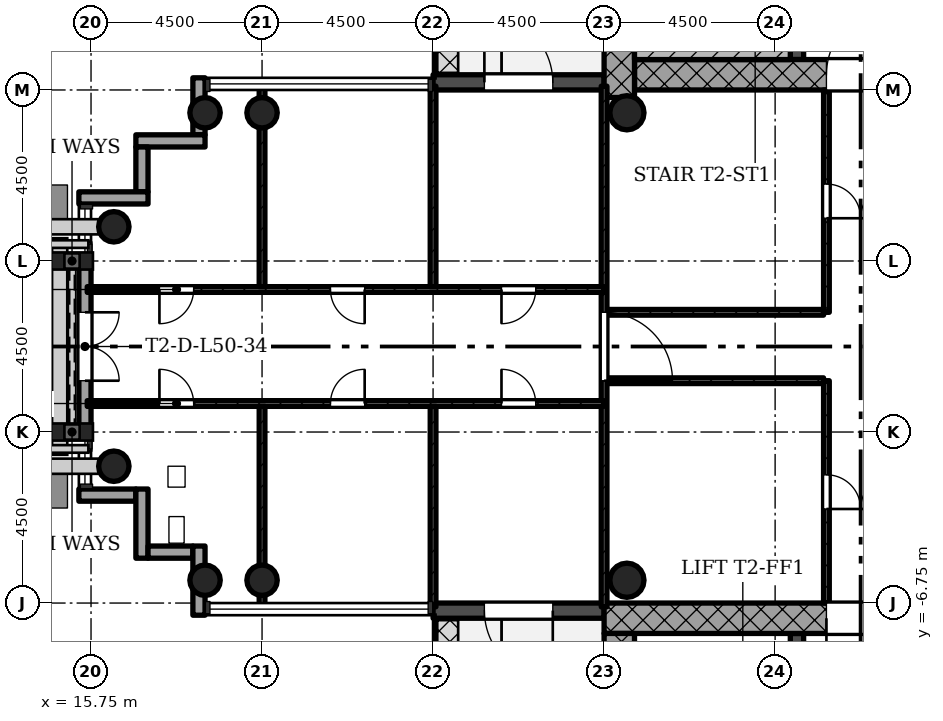
"""IFC4 building model, lengths in metres.
Left out: names, types, materials, properties, quantities, classifications, styles, units other than length and angle.
Written with IfcOpenShell. Run it as: python <this file> out.ifc"""

import sys

from ifc_helpers import new_model, si_unit, direction, frame, frame_2d, origin, origin_2d, place, context, subcontext, project, spatial, rectangle, hollow_circle, extrude, element, fill, save


model = new_model("IFC4")
c1 = context("Model", 3, precision=1e-05, world=origin(), true_north=direction((0.0, 1.0)))
c2 = subcontext(c1, "Body", "Model", "MODEL_VIEW")
j1 = project(units=[si_unit("LENGTHUNIT", "METRE"), si_unit("PLANEANGLEUNIT", "RADIAN")], contexts=[c1])
p1 = place(None, origin())
s1 = spatial("IfcSite", under=j1, at=p1, CompositionType="ELEMENT")
p2 = place(p1, origin())
s2 = spatial("IfcBuilding", under=s1, at=p2, CompositionType="ELEMENT")
p3 = place(p2, frame((0.0, 0.0, 181.3)))
s3 = spatial("IfcBuildingStorey", under=s2, at=p3, CompositionType="ELEMENT", Elevation=181.3)
p4 = place(p3, frame((30.05, 7.15, 0.0), z_axis=(0.0, 0.0, 1.0), x_axis=(1.0, 0.0, 0.0)))
e1 = element("IfcWall", 1, at=p4, inside=s3, PredefinedType="SHEAR", context=c2, shape_type="SweptSolid", body=[
    extrude(rectangle(XDim=12.7, YDim=0.8, at=frame_2d((6.35, 0.0))), origin(), (0.0, 0.0, 1.0), 4.5),
])
p5 = place(p4, frame((5.05, 0.0, 0.0)))
e2 = element("IfcOpeningElement", 2, at=p5, cuts=e1, PredefinedType="OPENING", context=c2, shape_type="SweptSolid", body=[
    extrude(rectangle(XDim=1.8, YDim=2.1, at=frame_2d((0.9, 1.05))), frame((0.0, 0.41, 0.0), z_axis=(0.0, -1.0, 0.0), x_axis=(1.0, 0.0, 0.0)), (0.0, 0.0, 1.0), 0.82),
])
p6 = place(p3, frame((29.65, 15.348, 0.0), z_axis=(0.0, 0.0, 1.0), x_axis=(0.0, -1.0, 0.0)))
e3 = element("IfcWall", 3, at=p6, inside=s3, PredefinedType="SHEAR", context=c2, shape_type="SweptSolid", body=[
    extrude(rectangle(XDim=8.796, YDim=0.8, at=frame_2d((4.398, 0.0))), origin(), (0.0, 0.0, 1.0), 4.5),
])
p7 = place(p3, frame((34.325, 7.55, 0.0), z_axis=(0.0, 0.0, 1.0), x_axis=(0.0, 1.0, 0.0)))
e4 = element("IfcWall", 4, at=p7, inside=s3, PredefinedType="SHEAR", context=c2, shape_type="SweptSolid", body=[
    extrude(rectangle(XDim=7.4, YDim=0.35, at=frame_2d((3.7, 0.0))), origin(), (0.0, 0.0, 1.0), 4.5),
])
p8 = place(p7, frame((0.85, 0.0, 0.0)))
e5 = element("IfcOpeningElement", 5, at=p8, cuts=e4, PredefinedType="OPENING", context=c2, shape_type="SweptSolid", body=[
    extrude(rectangle(XDim=0.9, YDim=2.1, at=frame_2d((0.45, 1.05))), frame((0.0, 0.185, 0.0), z_axis=(0.0, -1.0, 0.0), x_axis=(1.0, 0.0, 0.0)), (0.0, 0.0, 1.0), 0.37),
])
p9 = place(p3, frame((41.95, -7.15, 0.0), z_axis=(0.0, 0.0, 1.0), x_axis=(-1.0, 0.0, 0.0)))
e6 = element("IfcWall", 6, at=p9, inside=s3, PredefinedType="SHEAR", context=c2, shape_type="SweptSolid", body=[
    extrude(rectangle(XDim=12.7, YDim=0.8, at=frame_2d((6.35, 0.0))), origin(), (0.0, 0.0, 1.0), 4.5),
])
p10 = place(p9, frame((5.05, 0.0, 0.0)))
e7 = element("IfcOpeningElement", 7, at=p10, cuts=e6, PredefinedType="OPENING", context=c2, shape_type="SweptSolid", body=[
    extrude(rectangle(XDim=1.8, YDim=2.1, at=frame_2d((0.9, 1.05))), frame((0.0, 0.41, 0.0), z_axis=(0.0, -1.0, 0.0), x_axis=(1.0, 0.0, 0.0)), (0.0, 0.0, 1.0), 0.82),
])
p11 = place(p3, frame((29.65, -7.55, 0.0), z_axis=(0.0, 0.0, 1.0), x_axis=(0.0, -1.0, 0.0)))
e8 = element("IfcWall", 8, at=p11, inside=s3, PredefinedType="SHEAR", context=c2, shape_type="SweptSolid", body=[
    extrude(rectangle(XDim=8.2, YDim=0.8, at=frame_2d((4.1, 0.0))), origin(), (0.0, 0.0, 1.0), 4.5),
])
p12 = place(p3, frame((34.325, -14.95, 0.0), z_axis=(0.0, 0.0, 1.0), x_axis=(0.0, 1.0, 0.0)))
e9 = element("IfcWall", 9, at=p12, inside=s3, PredefinedType="SHEAR", context=c2, shape_type="SweptSolid", body=[
    extrude(rectangle(XDim=7.4, YDim=0.35, at=frame_2d((3.7, 0.0))), origin(), (0.0, 0.0, 1.0), 4.5),
])
p13 = place(p12, frame((5.35, 0.0, 0.0)))
e10 = element("IfcOpeningElement", 10, at=p13, cuts=e9, PredefinedType="OPENING", context=c2, shape_type="SweptSolid", body=[
    extrude(rectangle(XDim=1.1, YDim=2.1, at=frame_2d((0.55, 1.05))), frame((0.0, 0.185, 0.0), z_axis=(0.0, -1.0, 0.0), x_axis=(1.0, 0.0, 0.0)), (0.0, 0.0, 1.0), 0.37),
])
p14 = place(p12, frame((1.0, 0.0, 0.0)))
e11 = element("IfcOpeningElement", 11, at=p14, cuts=e9, PredefinedType="OPENING", context=c2, shape_type="SweptSolid", body=[
    extrude(rectangle(XDim=1.1, YDim=2.1, at=frame_2d((0.55, 1.05))), frame((0.0, 0.185, 0.0), z_axis=(0.0, -1.0, 0.0), x_axis=(1.0, 0.0, 0.0)), (0.0, 0.0, 1.0), 0.37),
])
p15 = place(p12, frame((3.3, 0.0, 0.0)))
e12 = element("IfcOpeningElement", 12, at=p15, cuts=e9, PredefinedType="OPENING", context=c2, shape_type="SweptSolid", body=[
    extrude(rectangle(XDim=0.9, YDim=2.1, at=frame_2d((0.45, 1.05))), frame((0.0, 0.185, 0.0), z_axis=(0.0, -1.0, 0.0), x_axis=(1.0, 0.0, 0.0)), (0.0, 0.0, 1.0), 0.37),
])
for number, where, z_axis, x_axis in (
    (13, (20.25, 6.15, 0.0), (0.0, 0.0, 1.0), (1.0, 0.0, 0.0)),
    (14, (20.25, -6.15, 0.0), (0.0, 0.0, 1.0), (1.0, 0.0, 0.0)),
    (15, (18.75, 6.15, 0.0), (0.0, 0.0, 1.0), (1.0, 0.0, 0.0)),
    (16, (18.75, -6.15, 0.0), (0.0, 0.0, 1.0), (1.0, 0.0, 0.0)),
    (17, (16.35, 3.15, 0.0), (0.0, 0.0, 1.0), (1.0, 0.0, 0.0)),
    (18, (16.35, -3.15, 0.0), (0.0, 0.0, 1.0), (1.0, 0.0, 0.0)),
):
    element("IfcColumn", number, at=place(p3, frame(where, z_axis=z_axis, x_axis=x_axis)), inside=s3, PredefinedType="COLUMN", context=c2, shape_type="SweptSolid", body=[
        extrude(hollow_circle(Radius=0.4, WallThickness=0.028, at=origin_2d()), origin(), (0.0, 0.0, 1.0), 4.5),
    ])
for number, where, z_axis, x_axis in (
    (19, (29.85, 6.15, 0.0), (0.0, 0.0, 1.0), (1.0, 0.0, 0.0)),
    (20, (29.85, -6.15, 0.0), (0.0, 0.0, 1.0), (1.0, 0.0, 0.0)),
):
    element("IfcColumn", number, at=place(p3, frame(where, z_axis=z_axis, x_axis=x_axis)), inside=s3, PredefinedType="COLUMN", context=c2, shape_type="SweptSolid", body=[
        extrude(hollow_circle(Radius=0.45, WallThickness=0.032, at=origin_2d()), origin(), (0.0, 0.0, 1.0), 4.5),
    ])
p16 = place(p3, frame((29.25, 6.95, -0.02), z_axis=(0.0, 0.0, 1.0), x_axis=(-1.0, 0.0, 0.0)))
e21 = element("IfcWall", 21, at=p16, inside=s3, PredefinedType="STANDARD", context=c2, shape_type="SweptSolid", body=[
    extrude(rectangle(XDim=4.5, YDim=0.4, at=frame_2d((2.25, 0.0))), origin(), (0.0, 0.0, 1.0), 4.22),
])
p17 = place(p16, frame((1.35, 0.0, 0.02)))
e22 = element("IfcOpeningElement", 22, at=p17, cuts=e21, PredefinedType="OPENING", context=c2, shape_type="SweptSolid", body=[
    extrude(rectangle(XDim=1.8, YDim=2.1, at=frame_2d((0.9, 1.05))), frame((0.0, 0.21, 0.0), z_axis=(0.0, -1.0, 0.0), x_axis=(1.0, 0.0, 0.0)), (0.0, 0.0, 1.0), 0.42),
])
p18 = place(p3, frame((18.59, 7.07, -0.3), z_axis=(0.0, 0.0, 1.0), x_axis=(0.0, -1.0, 0.0)))
e23 = element("IfcWall", 23, at=p18, inside=s3, PredefinedType="STANDARD", context=c2, shape_type="SweptSolid", body=[
    extrude(rectangle(XDim=1.5, YDim=0.32, at=frame_2d((0.75, 0.0))), origin(), (0.0, 0.0, 1.0), 4.5),
])
p19 = place(p3, frame((18.75, 5.41, -0.3), z_axis=(0.0, 0.0, 1.0), x_axis=(-1.0, 0.0, 0.0)))
e24 = element("IfcWall", 24, at=p19, inside=s3, PredefinedType="STANDARD", context=c2, shape_type="SweptSolid", body=[
    extrude(rectangle(XDim=1.82, YDim=0.32, at=frame_2d((0.91, 0.0))), origin(), (0.0, 0.0, 1.0), 4.5),
])
p20 = place(p3, frame((17.09, 5.25, -0.3), z_axis=(0.0, 0.0, 1.0), x_axis=(0.0, -1.0, 0.0)))
e25 = element("IfcWall", 25, at=p20, inside=s3, PredefinedType="STANDARD", context=c2, shape_type="SweptSolid", body=[
    extrude(rectangle(XDim=1.18, YDim=0.32, at=frame_2d((0.59, 0.0))), origin(), (0.0, 0.0, 1.0), 4.5),
])
p21 = place(p3, frame((17.25, 3.91, -0.3), z_axis=(0.0, 0.0, 1.0), x_axis=(-1.0, 0.0, 0.0)))
e26 = element("IfcWall", 26, at=p21, inside=s3, PredefinedType="STANDARD", context=c2, shape_type="SweptSolid", body=[
    extrude(rectangle(XDim=1.82, YDim=0.32, at=frame_2d((0.91, 0.0))), origin(), (0.0, 0.0, 1.0), 4.5),
])
p22 = place(p3, frame((15.59, 2.25, 0.0), z_axis=(0.0, 0.0, 1.0), x_axis=(0.0, -1.0, 0.0)))
e27 = element("IfcWall", 27, at=p22, inside=s3, PredefinedType="STANDARD", context=c2, shape_type="SweptSolid", body=[
    extrude(rectangle(XDim=4.5, YDim=0.32, at=frame_2d((2.25, 0.0))), origin(), (0.0, 0.0, 1.0), 4.2),
])
p23 = place(p22, frame((1.35, 0.0, 0.0)))
e28 = element("IfcOpeningElement", 28, at=p23, cuts=e27, PredefinedType="OPENING", context=c2, shape_type="SweptSolid", body=[
    extrude(rectangle(XDim=1.8, YDim=2.1, at=frame_2d((0.9, 1.05))), frame((0.0, 0.17, 0.0), z_axis=(0.0, -1.0, 0.0), x_axis=(1.0, 0.0, 0.0)), (0.0, 0.0, 1.0), 0.34),
])
p24 = place(p3, frame((15.43, -3.91, -0.3), z_axis=(0.0, 0.0, 1.0), x_axis=(1.0, 0.0, 0.0)))
e29 = element("IfcWall", 29, at=p24, inside=s3, PredefinedType="STANDARD", context=c2, shape_type="SweptSolid", body=[
    extrude(rectangle(XDim=1.5, YDim=0.32, at=frame_2d((0.75, 0.0))), origin(), (0.0, 0.0, 1.0), 4.5),
])
p25 = place(p3, frame((17.09, -3.75, -0.3), z_axis=(0.0, 0.0, 1.0), x_axis=(0.0, -1.0, 0.0)))
e30 = element("IfcWall", 30, at=p25, inside=s3, PredefinedType="STANDARD", context=c2, shape_type="SweptSolid", body=[
    extrude(rectangle(XDim=1.82, YDim=0.32, at=frame_2d((0.91, 0.0))), origin(), (0.0, 0.0, 1.0), 4.5),
])
p26 = place(p3, frame((17.25, -5.41, -0.3), z_axis=(0.0, 0.0, 1.0), x_axis=(1.0, 0.0, 0.0)))
e31 = element("IfcWall", 31, at=p26, inside=s3, PredefinedType="STANDARD", context=c2, shape_type="SweptSolid", body=[
    extrude(rectangle(XDim=1.18, YDim=0.32, at=frame_2d((0.59, 0.0))), origin(), (0.0, 0.0, 1.0), 4.5),
])
p27 = place(p3, frame((18.59, -5.25, -0.3), z_axis=(0.0, 0.0, 1.0), x_axis=(0.0, -1.0, 0.0)))
e32 = element("IfcWall", 32, at=p27, inside=s3, PredefinedType="STANDARD", context=c2, shape_type="SweptSolid", body=[
    extrude(rectangle(XDim=1.82, YDim=0.32, at=frame_2d((0.91, 0.0))), origin(), (0.0, 0.0, 1.0), 4.5),
])
p28 = place(p3, frame((24.75, -6.95, -0.02), z_axis=(0.0, 0.0, 1.0), x_axis=(1.0, 0.0, 0.0)))
e33 = element("IfcWall", 33, at=p28, inside=s3, PredefinedType="STANDARD", context=c2, shape_type="SweptSolid", body=[
    extrude(rectangle(XDim=4.5, YDim=0.4, at=frame_2d((2.25, 0.0))), origin(), (0.0, 0.0, 1.0), 4.22),
])
p29 = place(p28, frame((1.35, 0.0, 0.02)))
e34 = element("IfcOpeningElement", 34, at=p29, cuts=e33, PredefinedType="OPENING", context=c2, shape_type="SweptSolid", body=[
    extrude(rectangle(XDim=1.8, YDim=2.1, at=frame_2d((0.9, 1.05))), frame((0.0, 0.21, 0.0), z_axis=(0.0, -1.0, 0.0), x_axis=(1.0, 0.0, 0.0)), (0.0, 0.0, 1.0), 0.42),
])
p30 = place(p3, frame((35.1, 0.9, 0.0), z_axis=(0.0, 0.0, 1.0), x_axis=(0.0, 1.0, 0.0)))
e35 = element("IfcWall", 35, at=p30, inside=s3, PredefinedType="PARTITIONING", context=c2, shape_type="SweptSolid", body=[
    extrude(rectangle(XDim=5.85, YDim=0.15, at=frame_2d((2.925, 0.0))), origin(), (0.0, 0.0, 1.0), 4.08),
])
p31 = place(p30, frame((2.475, 0.0, 0.0)))
e36 = element("IfcOpeningElement", 36, at=p31, cuts=e35, PredefinedType="OPENING", context=c2, shape_type="SweptSolid", body=[
    extrude(rectangle(XDim=0.9, YDim=2.1, at=frame_2d((0.45, 1.05))), frame((0.0, 0.085, 0.0), z_axis=(0.0, -1.0, 0.0), x_axis=(1.0, 0.0, 0.0)), (0.0, 0.0, 1.0), 0.17),
])
p32 = place(p3, frame((35.025, 0.9, 0.0), z_axis=(0.0, 0.0, 1.0), x_axis=(-1.0, 0.0, 0.0)))
e37 = element("IfcWall", 37, at=p32, inside=s3, PredefinedType="PARTITIONING", context=c2, shape_type="SweptSolid", body=[
    extrude(rectangle(XDim=5.7, YDim=0.15, at=frame_2d((2.85, 0.0))), origin(), (0.0, 0.0, 1.0), 4.08),
])
p33 = place(p3, frame((35.1, -6.75, 0.0), z_axis=(0.0, 0.0, 1.0), x_axis=(0.0, 1.0, 0.0)))
e38 = element("IfcWall", 38, at=p33, inside=s3, PredefinedType="PARTITIONING", context=c2, shape_type="SweptSolid", body=[
    extrude(rectangle(XDim=5.85, YDim=0.15, at=frame_2d((2.925, 0.0))), origin(), (0.0, 0.0, 1.0), 4.08),
])
p34 = place(p33, frame((2.475, 0.0, 0.0)))
e39 = element("IfcOpeningElement", 39, at=p34, cuts=e38, PredefinedType="OPENING", context=c2, shape_type="SweptSolid", body=[
    extrude(rectangle(XDim=0.9, YDim=2.1, at=frame_2d((0.45, 1.05))), frame((0.0, 0.085, 0.0), z_axis=(0.0, -1.0, 0.0), x_axis=(1.0, 0.0, 0.0)), (0.0, 0.0, 1.0), 0.17),
])
p35 = place(p3, frame((35.025, -0.9, 0.0), z_axis=(0.0, 0.0, 1.0), x_axis=(-1.0, 0.0, 0.0)))
e40 = element("IfcWall", 40, at=p35, inside=s3, PredefinedType="PARTITIONING", context=c2, shape_type="SweptSolid", body=[
    extrude(rectangle(XDim=5.7, YDim=0.15, at=frame_2d((2.85, 0.0))), origin(), (0.0, 0.0, 1.0), 4.08),
])
p36 = place(p3, frame((29.25, -6.85, 0.0), z_axis=(0.0, 0.0, 1.0), x_axis=(0.0, 1.0, 0.0)))
e41 = element("IfcWall", 41, at=p36, inside=s3, PredefinedType="PARTITIONING", context=c2, shape_type="SweptSolid", body=[
    extrude(rectangle(XDim=13.7, YDim=0.15, at=frame_2d((6.85, 0.0))), origin(), (0.0, 0.0, 1.0), 4.08),
])
p37 = place(p36, frame((5.95, 0.0, 0.0)))
e42 = element("IfcOpeningElement", 42, at=p37, cuts=e41, PredefinedType="OPENING", context=c2, shape_type="SweptSolid", body=[
    extrude(rectangle(XDim=1.8, YDim=2.1, at=frame_2d((0.9, 1.05))), frame((0.0, 0.085, 0.0), z_axis=(0.0, -1.0, 0.0), x_axis=(1.0, 0.0, 0.0)), (0.0, 0.0, 1.0), 0.17),
])
p38 = place(p3, frame((29.25, 1.5, 0.0), z_axis=(0.0, 0.0, 1.0), x_axis=(-1.0, 0.0, 0.0)))
e43 = element("IfcWall", 43, at=p38, inside=s3, PredefinedType="PARTITIONING", context=c2, shape_type="SweptSolid", body=[
    extrude(rectangle(XDim=13.6, YDim=0.15, at=frame_2d((6.8, 0.0))), origin(), (0.0, 0.0, 1.0), 4.08),
])
p39 = place(p38, frame((1.8, 0.0, 0.0)))
e44 = element("IfcOpeningElement", 44, at=p39, cuts=e43, PredefinedType="OPENING", context=c2, shape_type="SweptSolid", body=[
    extrude(rectangle(XDim=0.9, YDim=2.1, at=frame_2d((0.45, 1.05))), frame((0.0, 0.085, 0.0), z_axis=(0.0, -1.0, 0.0), x_axis=(1.0, 0.0, 0.0)), (0.0, 0.0, 1.0), 0.17),
])
p40 = place(p38, frame((6.3, 0.0, 0.0)))
e45 = element("IfcOpeningElement", 45, at=p40, cuts=e43, PredefinedType="OPENING", context=c2, shape_type="SweptSolid", body=[
    extrude(rectangle(XDim=0.9, YDim=2.1, at=frame_2d((0.45, 1.05))), frame((0.0, 0.085, 0.0), z_axis=(0.0, -1.0, 0.0), x_axis=(1.0, 0.0, 0.0)), (0.0, 0.0, 1.0), 0.17),
])
p41 = place(p38, frame((10.8, 0.0, 0.0)))
e46 = element("IfcOpeningElement", 46, at=p41, cuts=e43, PredefinedType="OPENING", context=c2, shape_type="SweptSolid", body=[
    extrude(rectangle(XDim=0.9, YDim=2.1, at=frame_2d((0.45, 1.05))), frame((0.0, 0.085, 0.0), z_axis=(0.0, -1.0, 0.0), x_axis=(1.0, 0.0, 0.0)), (0.0, 0.0, 1.0), 0.17),
])
for number, where, z_axis, x_axis in (
    (47, (24.75, 1.575, 0.0), (0.0, 0.0, 1.0), (0.0, 1.0, 0.0)),
    (48, (20.25, 1.575, 0.0), (0.0, 0.0, 1.0), (0.0, 1.0, 0.0)),
):
    element("IfcWall", number, at=place(p3, frame(where, z_axis=z_axis, x_axis=x_axis)), inside=s3, PredefinedType="PARTITIONING", context=c2, shape_type="SweptSolid", body=[
        extrude(rectangle(XDim=5.275, YDim=0.15, at=frame_2d((2.638, 0.0))), origin(), (0.0, 0.0, 1.0), 4.08),
    ])
p42 = place(p3, frame((29.25, -1.5, 0.0), z_axis=(0.0, 0.0, 1.0), x_axis=(-1.0, 0.0, 0.0)))
e49 = element("IfcWall", 49, at=p42, inside=s3, PredefinedType="PARTITIONING", context=c2, shape_type="SweptSolid", body=[
    extrude(rectangle(XDim=13.6, YDim=0.15, at=frame_2d((6.8, 0.0))), origin(), (0.0, 0.0, 1.0), 4.08),
])
p43 = place(p42, frame((1.8, 0.0, 0.0)))
e50 = element("IfcOpeningElement", 50, at=p43, cuts=e49, PredefinedType="OPENING", context=c2, shape_type="SweptSolid", body=[
    extrude(rectangle(XDim=0.9, YDim=2.1, at=frame_2d((0.45, 1.05))), frame((0.0, 0.085, 0.0), z_axis=(0.0, -1.0, 0.0), x_axis=(1.0, 0.0, 0.0)), (0.0, 0.0, 1.0), 0.17),
])
p44 = place(p42, frame((6.3, 0.0, 0.0)))
e51 = element("IfcOpeningElement", 51, at=p44, cuts=e49, PredefinedType="OPENING", context=c2, shape_type="SweptSolid", body=[
    extrude(rectangle(XDim=0.9, YDim=2.1, at=frame_2d((0.45, 1.05))), frame((0.0, 0.085, 0.0), z_axis=(0.0, -1.0, 0.0), x_axis=(1.0, 0.0, 0.0)), (0.0, 0.0, 1.0), 0.17),
])
p45 = place(p42, frame((10.8, 0.0, 0.0)))
e52 = element("IfcOpeningElement", 52, at=p45, cuts=e49, PredefinedType="OPENING", context=c2, shape_type="SweptSolid", body=[
    extrude(rectangle(XDim=0.9, YDim=2.1, at=frame_2d((0.45, 1.05))), frame((0.0, 0.085, 0.0), z_axis=(0.0, -1.0, 0.0), x_axis=(1.0, 0.0, 0.0)), (0.0, 0.0, 1.0), 0.17),
])
for number, where, z_axis, x_axis in (
    (53, (24.75, -1.575, 0.0), (0.0, 0.0, 1.0), (0.0, -1.0, 0.0)),
    (54, (20.25, -1.575, 0.0), (0.0, 0.0, 1.0), (0.0, -1.0, 0.0)),
):
    element("IfcWall", number, at=place(p3, frame(where, z_axis=z_axis, x_axis=x_axis)), inside=s3, PredefinedType="PARTITIONING", context=c2, shape_type="SweptSolid", body=[
        extrude(rectangle(XDim=5.275, YDim=0.15, at=frame_2d((2.638, 0.0))), origin(), (0.0, 0.0, 1.0), 4.08),
    ])
p46 = place(p3, frame((34.15, 7.75, 0.0), z_axis=(0.0, 0.0, 1.0), x_axis=(-1.0, 0.0, 0.0)))
e55 = element("IfcWall", 55, at=p46, inside=s3, PredefinedType="SHEAR", context=c2, shape_type="SweptSolid", body=[
    extrude(rectangle(XDim=4.1, YDim=0.4, at=frame_2d((2.05, 0.0))), origin(), (0.0, 0.0, 1.0), 4.5),
])
p47 = place(p17, origin())
e56 = element("IfcDoor", 56, at=p47, inside=s3, OperationType="SINGLE_SWING_RIGHT", PredefinedType="DOOR", context=c2, shape_type="SweptSolid", body=[
    extrude(rectangle(XDim=1.8, YDim=2.1, at=frame_2d((0.9, 1.05))), frame((0.0, 0.025, 0.0), z_axis=(0.0, -1.0, 0.0), x_axis=(1.0, 0.0, 0.0)), (0.0, 0.0, 1.0), 0.05),
])
fill(e22, e56)
p48 = place(p23, origin())
e57 = element("IfcDoor", 57, at=p48, inside=s3, OperationType="DOUBLE_DOOR_SINGLE_SWING", PredefinedType="DOOR", context=c2, shape_type="SweptSolid", body=[
    extrude(rectangle(XDim=1.8, YDim=2.1, at=frame_2d((0.9, 1.05))), frame((0.0, 0.025, 0.0), z_axis=(0.0, -1.0, 0.0), x_axis=(1.0, 0.0, 0.0)), (0.0, 0.0, 1.0), 0.05),
])
fill(e28, e57)
p49 = place(p29, origin())
e58 = element("IfcDoor", 58, at=p49, inside=s3, OperationType="SINGLE_SWING_RIGHT", PredefinedType="DOOR", context=c2, shape_type="SweptSolid", body=[
    extrude(rectangle(XDim=1.8, YDim=2.1, at=frame_2d((0.9, 1.05))), frame((0.0, 0.025, 0.0), z_axis=(0.0, -1.0, 0.0), x_axis=(1.0, 0.0, 0.0)), (0.0, 0.0, 1.0), 0.05),
])
fill(e34, e58)
p50 = place(p31, origin())
e59 = element("IfcDoor", 59, at=p50, inside=s3, OperationType="SINGLE_SWING_LEFT", PredefinedType="DOOR", context=c2, shape_type="SweptSolid", body=[
    extrude(rectangle(XDim=0.9, YDim=2.1, at=frame_2d((0.45, 1.05))), frame((0.0, 0.025, 0.0), z_axis=(0.0, -1.0, 0.0), x_axis=(1.0, 0.0, 0.0)), (0.0, 0.0, 1.0), 0.05),
])
fill(e36, e59)
p51 = place(p34, origin())
e60 = element("IfcDoor", 60, at=p51, inside=s3, OperationType="SINGLE_SWING_LEFT", PredefinedType="DOOR", context=c2, shape_type="SweptSolid", body=[
    extrude(rectangle(XDim=0.9, YDim=2.1, at=frame_2d((0.45, 1.05))), frame((0.0, 0.025, 0.0), z_axis=(0.0, -1.0, 0.0), x_axis=(1.0, 0.0, 0.0)), (0.0, 0.0, 1.0), 0.05),
])
fill(e39, e60)
p52 = place(p37, origin())
e61 = element("IfcDoor", 61, at=p52, inside=s3, OperationType="SINGLE_SWING_LEFT", PredefinedType="DOOR", context=c2, shape_type="SweptSolid", body=[
    extrude(rectangle(XDim=1.8, YDim=2.1, at=frame_2d((0.9, 1.05))), frame((0.0, 0.025, 0.0), z_axis=(0.0, -1.0, 0.0), x_axis=(1.0, 0.0, 0.0)), (0.0, 0.0, 1.0), 0.05),
])
fill(e42, e61)
p53 = place(p39, origin())
e62 = element("IfcDoor", 62, at=p53, inside=s3, OperationType="SINGLE_SWING_LEFT", PredefinedType="DOOR", context=c2, shape_type="SweptSolid", body=[
    extrude(rectangle(XDim=0.9, YDim=2.1, at=frame_2d((0.45, 1.05))), frame((0.0, 0.025, 0.0), z_axis=(0.0, -1.0, 0.0), x_axis=(1.0, 0.0, 0.0)), (0.0, 0.0, 1.0), 0.05),
])
fill(e44, e62)
p54 = place(p40, origin())
e63 = element("IfcDoor", 63, at=p54, inside=s3, OperationType="SINGLE_SWING_RIGHT", PredefinedType="DOOR", context=c2, shape_type="SweptSolid", body=[
    extrude(rectangle(XDim=0.9, YDim=2.1, at=frame_2d((0.45, 1.05))), frame((0.0, 0.025, 0.0), z_axis=(0.0, -1.0, 0.0), x_axis=(1.0, 0.0, 0.0)), (0.0, 0.0, 1.0), 0.05),
])
fill(e45, e63)
p55 = place(p41, origin())
e64 = element("IfcDoor", 64, at=p55, inside=s3, OperationType="SINGLE_SWING_LEFT", PredefinedType="DOOR", context=c2, shape_type="SweptSolid", body=[
    extrude(rectangle(XDim=0.9, YDim=2.1, at=frame_2d((0.45, 1.05))), frame((0.0, 0.025, 0.0), z_axis=(0.0, -1.0, 0.0), x_axis=(1.0, 0.0, 0.0)), (0.0, 0.0, 1.0), 0.05),
])
fill(e46, e64)
p56 = place(p43, origin())
e65 = element("IfcDoor", 65, at=p56, inside=s3, OperationType="SINGLE_SWING_RIGHT", PredefinedType="DOOR", context=c2, shape_type="SweptSolid", body=[
    extrude(rectangle(XDim=0.9, YDim=2.1, at=frame_2d((0.45, 1.05))), frame((0.0, 0.025, 0.0), z_axis=(0.0, -1.0, 0.0), x_axis=(1.0, 0.0, 0.0)), (0.0, 0.0, 1.0), 0.05),
])
fill(e50, e65)
p57 = place(p44, origin())
e66 = element("IfcDoor", 66, at=p57, inside=s3, OperationType="SINGLE_SWING_LEFT", PredefinedType="DOOR", context=c2, shape_type="SweptSolid", body=[
    extrude(rectangle(XDim=0.9, YDim=2.1, at=frame_2d((0.45, 1.05))), frame((0.0, 0.025, 0.0), z_axis=(0.0, -1.0, 0.0), x_axis=(1.0, 0.0, 0.0)), (0.0, 0.0, 1.0), 0.05),
])
fill(e51, e66)
p58 = place(p45, origin())
e67 = element("IfcDoor", 67, at=p58, inside=s3, OperationType="SINGLE_SWING_RIGHT", PredefinedType="DOOR", context=c2, shape_type="SweptSolid", body=[
    extrude(rectangle(XDim=0.9, YDim=2.1, at=frame_2d((0.45, 1.05))), frame((0.0, 0.025, 0.0), z_axis=(0.0, -1.0, 0.0), x_axis=(1.0, 0.0, 0.0)), (0.0, 0.0, 1.0), 0.05),
])
fill(e52, e67)
p59 = place(p5, origin())
e68 = element("IfcDoor", 68, at=p59, inside=s3, OperationType="SINGLE_SWING_LEFT", PredefinedType="DOOR", context=c2, shape_type="SweptSolid", body=[
    extrude(rectangle(XDim=1.8, YDim=2.1, at=frame_2d((0.9, 1.05))), frame((0.0, 0.025, 0.0), z_axis=(0.0, -1.0, 0.0), x_axis=(1.0, 0.0, 0.0)), (0.0, 0.0, 1.0), 0.05),
])
fill(e2, e68)
p60 = place(p10, origin())
e69 = element("IfcDoor", 69, at=p60, inside=s3, OperationType="SINGLE_SWING_LEFT", PredefinedType="DOOR", context=c2, shape_type="SweptSolid", body=[
    extrude(rectangle(XDim=1.8, YDim=2.1, at=frame_2d((0.9, 1.05))), frame((0.0, 0.025, 0.0), z_axis=(0.0, -1.0, 0.0), x_axis=(1.0, 0.0, 0.0)), (0.0, 0.0, 1.0), 0.05),
])
fill(e7, e69)
save(model, sys.argv[1])
